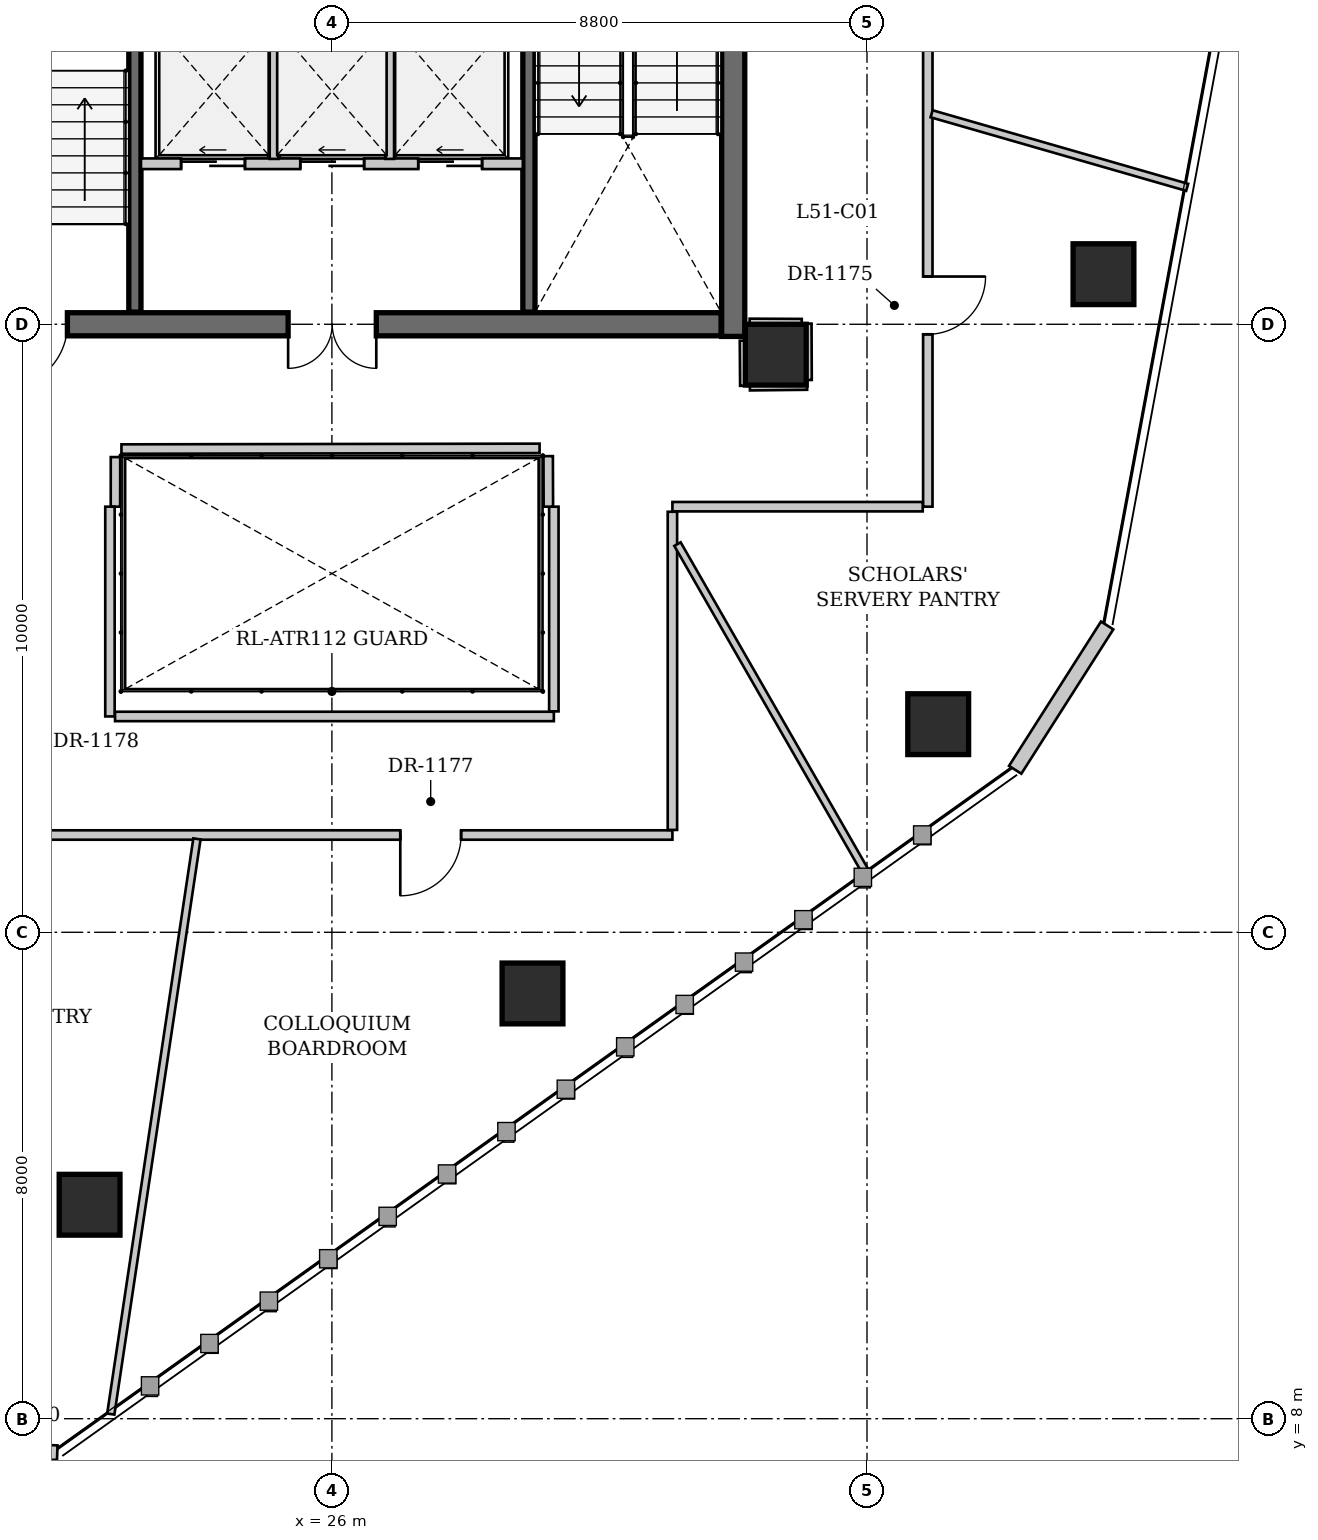
"""IFC4 building model, lengths in metres.
Left out: names, types, materials, properties, quantities, classifications, styles, units other than length and angle.
Written with IfcOpenShell. Run it as: python <this file> out.ifc"""

import sys

from ifc_helpers import new_model, si_unit, direction, frame, frame_2d, origin, origin_2d, place, context, subcontext, project, spatial, rectangle, extrude, source, transform, mapped, element, fill, save


model = new_model("IFC4")
c1 = context("Model", 3, precision=1e-05, world=origin(), true_north=direction((0.0, 1.0)))
c2 = subcontext(c1, "Body", "Model", "MODEL_VIEW")
j1 = project(units=[si_unit("LENGTHUNIT", "METRE"), si_unit("PLANEANGLEUNIT", "RADIAN")], contexts=[c1])
p1 = place(None, origin())
s1 = spatial("IfcSite", under=j1, at=p1, CompositionType="ELEMENT")
p2 = place(p1, origin())
s2 = spatial("IfcBuilding", under=s1, at=p2, CompositionType="ELEMENT")
p3 = place(p2, frame((0.0, 0.0, 195.0)))
s3 = spatial("IfcBuildingStorey", under=s2, at=p3, CompositionType="ELEMENT", Elevation=195.0)
for number, where, z_axis, x_axis in (
    (1, (38.689, 26.824, 0.0), (0.0, 0.0, 1.0), (1.0, 0.0, 0.0)),
    (2, (35.971, 19.423, 0.0), (0.0, 0.0, 1.0), (1.0, 0.0, 0.0)),
    (3, (29.299, 14.994, 0.0), (0.0, 0.0, 1.0), (1.0, 0.0, 0.0)),
    (4, (22.015, 11.519, 0.0), (0.0, 0.0, 1.0), (1.0, 0.0, 0.0)),
    (5, (33.3, 25.5, 0.0), (0.0, 0.0, 1.0), (1.0, 0.0, 0.0)),
):
    element("IfcColumn", number, at=place(p3, frame(where, z_axis=z_axis, x_axis=x_axis)), inside=s3, PredefinedType="COLUMN", context=c2, shape_type="SweptSolid", body=[
        extrude(rectangle(XDim=1.0, YDim=1.0, at=origin_2d()), origin(), (0.0, 0.0, 1.0), 3.23),
    ])
p4 = place(p3, frame((21.483, 7.441, 0.0), z_axis=(0.0, 0.0, 1.0), x_axis=(-0.999345597318, 0.036171495987, 0.0)))
e6 = element("IfcWall", 6, at=p4, inside=s3, PredefinedType="SOLIDWALL", context=c2, shape_type="SweptSolid", body=[
    extrude(rectangle(XDim=1.978, YDim=0.24, at=frame_2d((0.989, 0.0))), origin(), (0.0, 0.0, 1.0), 3.23),
])
p5 = place(p3, frame((38.75, 21.047, 0.0), z_axis=(0.0, 0.0, 1.0), x_axis=(-0.537329939946, -0.843372121687, 0.0)))
e7 = element("IfcWall", 7, at=p5, inside=s3, PredefinedType="SOLIDWALL", context=c2, shape_type="SweptSolid", body=[
    extrude(rectangle(XDim=2.815, YDim=0.24, at=frame_2d((1.408, 0.0))), origin(), (0.0, 0.0, 1.0), 3.23),
])
p6 = place(p3, frame((32.6, 36.6, 0.0), z_axis=(0.0, 0.0, 1.0), x_axis=(0.0, -1.0, 0.0)))
e8 = element("IfcWall", 8, at=p6, inside=s3, PredefinedType="SHEAR", context=c2, shape_type="SweptSolid", body=[
    extrude(rectangle(XDim=10.8, YDim=0.38, at=frame_2d((5.4, 0.0))), origin(), (0.0, 0.0, 1.0), 3.5),
])
p7 = place(p6, frame((3.7, 0.0, 0.0)))
e9 = element("IfcOpeningElement", 9, at=p7, cuts=e8, PredefinedType="OPENING", context=c2, shape_type="SweptSolid", body=[
    extrude(rectangle(XDim=1.05, YDim=2.15, at=frame_2d((0.525, 1.075))), frame((0.0, 0.2, 0.0), z_axis=(0.0, -1.0, 0.0), x_axis=(1.0, 0.0, 0.0)), (0.0, 0.0, 1.0), 0.4),
])
p8 = place(p6, frame((2.05, 0.0, 0.0)))
e10 = element("IfcOpeningElement", 10, at=p8, cuts=e8, PredefinedType="OPENING", context=c2, shape_type="SweptSolid", body=[
    extrude(rectangle(XDim=0.9, YDim=2.1, at=frame_2d((0.45, 1.05))), frame((0.0, 0.2, 0.0), z_axis=(0.0, -1.0, 0.0), x_axis=(1.0, 0.0, 0.0)), (0.0, 0.0, 1.0), 0.4),
])
p9 = place(p3, frame((32.4, 26.0, 0.0), z_axis=(0.0, 0.0, 1.0), x_axis=(-1.0, 0.0, 0.0)))
e11 = element("IfcWall", 11, at=p9, inside=s3, PredefinedType="SHEAR", context=c2, shape_type="SweptSolid", body=[
    extrude(rectangle(XDim=12.8, YDim=0.38, at=frame_2d((6.4, 0.0))), origin(), (0.0, 0.0, 1.0), 3.5),
])
p10 = place(p9, frame((10.75, 0.0, 0.0)))
e12 = element("IfcOpeningElement", 12, at=p10, cuts=e11, PredefinedType="OPENING", context=c2, shape_type="SweptSolid", body=[
    extrude(rectangle(XDim=1.05, YDim=2.15, at=frame_2d((0.525, 1.075))), frame((0.0, 0.2, 0.0), z_axis=(0.0, -1.0, 0.0), x_axis=(1.0, 0.0, 0.0)), (0.0, 0.0, 1.0), 0.4),
])
p11 = place(p9, frame((5.67, 0.0, 0.0)))
e13 = element("IfcOpeningElement", 13, at=p11, cuts=e11, PredefinedType="OPENING", context=c2, shape_type="SweptSolid", body=[
    extrude(rectangle(XDim=1.45, YDim=2.2, at=frame_2d((0.725, 1.1))), frame((0.0, 0.2, 0.0), z_axis=(0.0, -1.0, 0.0), x_axis=(1.0, 0.0, 0.0)), (0.0, 0.0, 1.0), 0.4),
])
p12 = place(p3, frame((22.76, 26.2, 0.0), z_axis=(0.0, 0.0, 1.0), x_axis=(0.0, 1.0, 0.0)))
e14 = element("IfcWall", 14, at=p12, inside=s3, PredefinedType="SHEAR", context=c2, shape_type="SweptSolid", body=[
    extrude(rectangle(XDim=10.0, YDim=0.2, at=frame_2d((5.0, 0.0))), origin(), (0.0, 0.0, 1.0), 3.5),
])
p13 = place(p3, frame((29.24, 26.2, 0.0), z_axis=(0.0, 0.0, 1.0), x_axis=(0.0, 1.0, 0.0)))
e15 = element("IfcWall", 15, at=p13, inside=s3, PredefinedType="SHEAR", context=c2, shape_type="SweptSolid", body=[
    extrude(rectangle(XDim=10.0, YDim=0.2, at=frame_2d((5.0, 0.0))), origin(), (0.0, 0.0, 1.0), 3.5),
])
p14 = place(p13, frame((5.65, 0.0, 0.0)))
e16 = element("IfcOpeningElement", 16, at=p14, cuts=e15, PredefinedType="OPENING", context=c2, shape_type="SweptSolid", body=[
    extrude(rectangle(XDim=1.05, YDim=2.15, at=frame_2d((0.525, 1.075))), frame((0.0, 0.11, 0.0), z_axis=(0.0, -1.0, 0.0), x_axis=(1.0, 0.0, 0.0)), (0.0, 0.0, 1.0), 0.22),
])
p15 = place(p3, frame((22.86, 28.64, 0.0), z_axis=(0.0, 0.0, 1.0), x_axis=(1.0, 0.0, 0.0)))
e17 = element("IfcWall", 17, at=p15, inside=s3, PredefinedType="SOLIDWALL", context=c2, shape_type="SweptSolid", body=[
    extrude(rectangle(XDim=6.28, YDim=0.175, at=frame_2d((3.14, 0.0))), origin(), (0.0, 0.0, 1.0), 3.23),
])
p16 = place(p15, frame((0.66, 0.0, 0.0)))
e18 = element("IfcOpeningElement", 18, at=p16, cuts=e17, PredefinedType="OPENING", context=c2, shape_type="SweptSolid", body=[
    extrude(rectangle(XDim=1.05, YDim=2.15, at=frame_2d((0.525, 1.075))), frame((0.0, 0.098, 0.0), z_axis=(0.0, -1.0, 0.0), x_axis=(1.0, 0.0, 0.0)), (0.0, 0.0, 1.0), 0.195),
])
p17 = place(p15, frame((2.62, 0.0, 0.0)))
e19 = element("IfcOpeningElement", 19, at=p17, cuts=e17, PredefinedType="OPENING", context=c2, shape_type="SweptSolid", body=[
    extrude(rectangle(XDim=1.05, YDim=2.15, at=frame_2d((0.525, 1.075))), frame((0.0, 0.098, 0.0), z_axis=(0.0, -1.0, 0.0), x_axis=(1.0, 0.0, 0.0)), (0.0, 0.0, 1.0), 0.195),
])
p18 = place(p15, frame((4.56, 0.0, 0.0)))
e20 = element("IfcOpeningElement", 20, at=p18, cuts=e17, PredefinedType="OPENING", context=c2, shape_type="SweptSolid", body=[
    extrude(rectangle(XDim=1.05, YDim=2.15, at=frame_2d((0.525, 1.075))), frame((0.0, 0.098, 0.0), z_axis=(0.0, -1.0, 0.0), x_axis=(1.0, 0.0, 0.0)), (0.0, 0.0, 1.0), 0.195),
])
for number, where, z_axis, x_axis in (
    (21, (25.05, 28.72, 0.0), (0.0, 0.0, 1.0), (0.0, 1.0, 0.0)),
    (22, (26.95, 28.72, 0.0), (0.0, 0.0, 1.0), (0.0, 1.0, 0.0)),
):
    element("IfcWall", number, at=place(p3, frame(where, z_axis=z_axis, x_axis=x_axis)), inside=s3, PredefinedType="SOLIDWALL", context=c2, shape_type="SweptSolid", body=[
        extrude(rectangle(XDim=2.207, YDim=0.145, at=frame_2d((1.103, 0.0))), origin(), (0.0, 0.0, 1.0), 3.23),
    ])
p19 = place(p3, frame((35.8, 36.6, 0.0), z_axis=(0.0, 0.0, 1.0), x_axis=(0.0, -1.0, 0.0)))
e23 = element("IfcWall", 23, at=p19, inside=s3, PredefinedType="PARTITIONING", context=c2, shape_type="SweptSolid", body=[
    extrude(rectangle(XDim=13.6, YDim=0.155, at=frame_2d((6.8, 0.0))), origin(), (0.0, 0.0, 1.0), 3.23),
])
p20 = place(p19, frame((9.815, 0.0, 0.0)))
e24 = element("IfcOpeningElement", 24, at=p20, cuts=e23, PredefinedType="OPENING", context=c2, shape_type="SweptSolid", body=[
    extrude(rectangle(XDim=0.95, YDim=2.15, at=frame_2d((0.475, 1.075))), frame((0.0, 0.087, 0.0), z_axis=(0.0, -1.0, 0.0), x_axis=(1.0, 0.0, 0.0)), (0.0, 0.0, 1.0), 0.175),
])
p21 = place(p19, frame((2.043, 0.0, 0.0)))
e25 = element("IfcOpeningElement", 25, at=p21, cuts=e23, PredefinedType="OPENING", context=c2, shape_type="SweptSolid", body=[
    extrude(rectangle(XDim=1.0, YDim=2.15, at=frame_2d((0.5, 1.075))), frame((0.0, 0.087, 0.0), z_axis=(0.0, -1.0, 0.0), x_axis=(1.0, 0.0, 0.0)), (0.0, 0.0, 1.0), 0.175),
])
p22 = place(p3, frame((31.6, 17.6, 0.0), z_axis=(0.0, 0.0, 1.0), x_axis=(-1.0, 0.0, 0.0)))
e26 = element("IfcWall", 26, at=p22, inside=s3, PredefinedType="PARTITIONING", context=c2, shape_type="SweptSolid", body=[
    extrude(rectangle(XDim=11.2, YDim=0.155, at=frame_2d((5.6, 0.0))), origin(), (0.0, 0.0, 1.0), 3.23),
])
p23 = place(p22, frame((3.475, 0.0, 0.0)))
e27 = element("IfcOpeningElement", 27, at=p23, cuts=e26, PredefinedType="OPENING", context=c2, shape_type="SweptSolid", body=[
    extrude(rectangle(XDim=1.0, YDim=2.15, at=frame_2d((0.5, 1.075))), frame((0.0, 0.087, 0.0), z_axis=(0.0, -1.0, 0.0), x_axis=(1.0, 0.0, 0.0)), (0.0, 0.0, 1.0), 0.175),
])
p24 = place(p3, frame((32.785, 25.73, 0.0), z_axis=(0.0, 0.0, 1.0), x_axis=(0.007570553288, -0.999971342951, 0.0)))
e28 = element("IfcWall", 28, at=p24, inside=s3, PredefinedType="PARTITIONING", context=c2, shape_type="SweptSolid", body=[
    extrude(rectangle(XDim=0.742, YDim=0.155, at=frame_2d((0.371, 0.0))), origin(), (0.0, 0.0, 1.0), 3.23),
])
p25 = place(p3, frame((32.874, 24.989, 0.0), z_axis=(0.0, 0.0, 1.0), x_axis=(0.999934835738, 0.01141596595, 0.0)))
e29 = element("IfcWall", 29, at=p25, inside=s3, PredefinedType="PARTITIONING", context=c2, shape_type="SweptSolid", body=[
    extrude(rectangle(XDim=0.941, YDim=0.155, at=frame_2d((0.47, 0.0))), origin(), (0.0, 0.0, 1.0), 3.23),
])
p26 = place(p3, frame((33.815, 25.083, 0.0), z_axis=(0.0, 0.0, 1.0), x_axis=(-0.004477173984, 0.999989977406, 0.0)))
e30 = element("IfcWall", 30, at=p26, inside=s3, PredefinedType="PARTITIONING", context=c2, shape_type="SweptSolid", body=[
    extrude(rectangle(XDim=0.927, YDim=0.155, at=frame_2d((0.463, 0.0))), origin(), (0.0, 0.0, 1.0), 3.23),
])
p27 = place(p3, frame((33.727, 26.011, 0.0), z_axis=(0.0, 0.0, 1.0), x_axis=(-0.999990868706, 0.004273465251, 0.0)))
e31 = element("IfcWall", 31, at=p27, inside=s3, PredefinedType="PARTITIONING", context=c2, shape_type="SweptSolid", body=[
    extrude(rectangle(XDim=0.857, YDim=0.155, at=frame_2d((0.428, 0.0))), origin(), (0.0, 0.0, 1.0), 3.23),
])
p28 = place(p3, frame((35.717, 23.0, 0.0), z_axis=(0.0, 0.0, 1.0), x_axis=(-1.0, 0.0, 0.0)))
e32 = element("IfcWall", 32, at=p28, inside=s3, PredefinedType="PARTITIONING", context=c2, shape_type="SweptSolid", body=[
    extrude(rectangle(XDim=4.116, YDim=0.155, at=frame_2d((2.058, 0.0))), origin(), (0.0, 0.0, 1.0), 3.23),
])
p29 = place(p3, frame((31.6, 22.917, 0.0), z_axis=(0.0, 0.0, 1.0), x_axis=(0.0, -1.0, 0.0)))
e33 = element("IfcWall", 33, at=p29, inside=s3, PredefinedType="PARTITIONING", context=c2, shape_type="SweptSolid", body=[
    extrude(rectangle(XDim=5.233, YDim=0.155, at=frame_2d((2.616, 0.0))), origin(), (0.0, 0.0, 1.0), 2.892),
])
p30 = place(p3, frame((29.416, 23.959, 0.0), z_axis=(0.0, 0.0, 1.0), x_axis=(-0.999998607957, -0.001668557745, 0.0)))
e34 = element("IfcWall", 34, at=p30, inside=s3, PredefinedType="PARTITIONING", context=c2, shape_type="SweptSolid", body=[
    extrude(rectangle(XDim=6.877, YDim=0.155, at=frame_2d((3.438, 0.0))), origin(), (0.0, 0.0, 1.0), 3.23),
])
p31 = place(p3, frame((22.441, 23.816, 0.0), z_axis=(0.0, 0.0, 1.0), x_axis=(-0.001197245475, -0.999999283301, 0.0)))
e35 = element("IfcWall", 35, at=p31, inside=s3, PredefinedType="PARTITIONING", context=c2, shape_type="SweptSolid", body=[
    extrude(rectangle(XDim=0.816, YDim=0.155, at=frame_2d((0.408, 0.0))), origin(), (0.0, 0.0, 1.0), 3.23),
])
p32 = place(p3, frame((22.35, 23.0, 0.0), z_axis=(0.0, 0.0, 1.0), x_axis=(0.0, -1.0, 0.0)))
e36 = element("IfcWall", 36, at=p32, inside=s3, PredefinedType="PARTITIONING", context=c2, shape_type="SweptSolid", body=[
    extrude(rectangle(XDim=3.45, YDim=0.155, at=frame_2d((1.725, 0.0))), origin(), (0.0, 0.0, 1.0), 3.23),
])
p33 = place(p3, frame((22.434, 19.55, 0.0), z_axis=(0.0, 0.0, 1.0), x_axis=(1.0, 0.0, 0.0)))
e37 = element("IfcWall", 37, at=p33, inside=s3, PredefinedType="PARTITIONING", context=c2, shape_type="SweptSolid", body=[
    extrude(rectangle(XDim=7.216, YDim=0.155, at=frame_2d((3.608, 0.0))), origin(), (0.0, 0.0, 1.0), 3.23),
])
p34 = place(p3, frame((29.65, 19.634, 0.0), z_axis=(0.0, 0.0, 1.0), x_axis=(0.0, 1.0, 0.0)))
e38 = element("IfcWall", 38, at=p34, inside=s3, PredefinedType="PARTITIONING", context=c2, shape_type="SweptSolid", body=[
    extrude(rectangle(XDim=3.366, YDim=0.155, at=frame_2d((1.683, 0.0))), origin(), (0.0, 0.0, 1.0), 3.23),
])
p35 = place(p3, frame((29.56, 23.0, 0.0), z_axis=(0.0, 0.0, 1.0), x_axis=(-0.003817887006, 0.999992711843, 0.0)))
e39 = element("IfcWall", 39, at=p35, inside=s3, PredefinedType="PARTITIONING", context=c2, shape_type="SweptSolid", body=[
    extrude(rectangle(XDim=0.831, YDim=0.155, at=frame_2d((0.416, 0.0))), origin(), (0.0, 0.0, 1.0), 3.23),
])
p36 = place(p3, frame((23.781, 17.536, 0.0), z_axis=(0.0, 0.0, 1.0), x_axis=(-0.148146984472, -0.988965353787, 0.0)))
e40 = element("IfcWall", 40, at=p36, inside=s3, PredefinedType="PARTITIONING", context=c2, shape_type="SweptSolid", body=[
    extrude(rectangle(XDim=9.565, YDim=0.12, at=frame_2d((4.782, 0.0))), origin(), (0.0, 0.0, 1.0), 3.23),
])
p37 = place(p3, frame((31.684, 22.385, 0.0), z_axis=(0.0, 0.0, 1.0), x_axis=(0.497684374139, -0.867358209587, 0.0)))
e41 = element("IfcWall", 41, at=p37, inside=s3, PredefinedType="PARTITIONING", context=c2, shape_type="SweptSolid", body=[
    extrude(rectangle(XDim=6.258, YDim=0.12, at=frame_2d((3.129, 0.0))), origin(), (0.0, 0.0, 1.0), 3.23),
])
p38 = place(p3, frame((35.863, 29.462, 0.0), z_axis=(0.0, 0.0, 1.0), x_axis=(0.960999786339, -0.276549110748, 0.0)))
e42 = element("IfcWall", 42, at=p38, inside=s3, PredefinedType="PARTITIONING", context=c2, shape_type="SweptSolid", body=[
    extrude(rectangle(XDim=4.374, YDim=0.12, at=frame_2d((2.187, 0.0))), origin(), (0.0, 0.0, 1.0), 3.23),
])
m1 = source(origin(), c2, "Body", "SweptSolid", [
    extrude(rectangle(XDim=1.05, YDim=2.15, at=frame_2d((0.525, 1.075))), frame((0.0, 0.025, 0.0), z_axis=(0.0, -1.0, 0.0), x_axis=(1.0, 0.0, 0.0)), (0.0, 0.0, 1.0), 0.05),
])
p39 = place(p10, origin())
e43 = element("IfcDoor", 43, at=p39, inside=s3, OperationType="SINGLE_SWING_RIGHT", PredefinedType="DOOR", context=c2, shape_type="MappedRepresentation", body=[
    mapped(m1, transform((0.0, 0.0, 0.0), x_axis=(1.0, 0.0, 0.0), y_axis=(0.0, 1.0, 0.0), z_axis=(0.0, 0.0, 1.0), scale=1.0)),
])
fill(e12, e43)
m2 = source(origin(), c2, "Body", "SweptSolid", [
    extrude(rectangle(XDim=1.45, YDim=2.2, at=frame_2d((0.725, 1.1))), frame((0.0, 0.025, 0.0), z_axis=(0.0, -1.0, 0.0), x_axis=(1.0, 0.0, 0.0)), (0.0, 0.0, 1.0), 0.05),
])
p40 = place(p11, origin())
e44 = element("IfcDoor", 44, at=p40, inside=s3, OperationType="DOUBLE_DOOR_SINGLE_SWING", PredefinedType="DOOR", context=c2, shape_type="MappedRepresentation", body=[
    mapped(m2, transform((0.0, 0.0, 0.0), x_axis=(1.0, 0.0, 0.0), y_axis=(0.0, 1.0, 0.0), z_axis=(0.0, 0.0, 1.0), scale=1.0)),
])
fill(e13, e44)
m3 = source(origin(), c2, "Body", "SweptSolid", [
    extrude(rectangle(XDim=1.05, YDim=2.15, at=frame_2d((0.525, 1.075))), frame((0.0, 0.025, 0.0), z_axis=(0.0, -1.0, 0.0), x_axis=(1.0, 0.0, 0.0)), (0.0, 0.0, 1.0), 0.05),
])
p41 = place(p16, origin())
e45 = element("IfcDoor", 45, at=p41, inside=s3, OperationType="SLIDING_TO_LEFT", PredefinedType="DOOR", context=c2, shape_type="MappedRepresentation", body=[
    mapped(m3, transform((0.0, 0.0, 0.0), x_axis=(1.0, 0.0, 0.0), y_axis=(0.0, 1.0, 0.0), z_axis=(0.0, 0.0, 1.0), scale=1.0)),
])
fill(e18, e45)
p42 = place(p17, origin())
e46 = element("IfcDoor", 46, at=p42, inside=s3, OperationType="SLIDING_TO_LEFT", PredefinedType="DOOR", context=c2, shape_type="MappedRepresentation", body=[
    mapped(m3, transform((0.0, 0.0, 0.0), x_axis=(1.0, 0.0, 0.0), y_axis=(0.0, 1.0, 0.0), z_axis=(0.0, 0.0, 1.0), scale=1.0)),
])
fill(e19, e46)
p43 = place(p18, origin())
e47 = element("IfcDoor", 47, at=p43, inside=s3, OperationType="SLIDING_TO_LEFT", PredefinedType="DOOR", context=c2, shape_type="MappedRepresentation", body=[
    mapped(m3, transform((0.0, 0.0, 0.0), x_axis=(1.0, 0.0, 0.0), y_axis=(0.0, 1.0, 0.0), z_axis=(0.0, 0.0, 1.0), scale=1.0)),
])
fill(e20, e47)
m4 = source(origin(), c2, "Body", "SweptSolid", [
    extrude(rectangle(XDim=0.95, YDim=2.15, at=frame_2d((0.475, 1.075))), frame((0.0, 0.025, 0.0), z_axis=(0.0, -1.0, 0.0), x_axis=(1.0, 0.0, 0.0)), (0.0, 0.0, 1.0), 0.05),
])
p44 = place(p20, origin())
e48 = element("IfcDoor", 48, at=p44, inside=s3, OperationType="SINGLE_SWING_LEFT", PredefinedType="DOOR", context=c2, shape_type="MappedRepresentation", body=[
    mapped(m4, transform((0.0, 0.0, 0.0), x_axis=(1.0, 0.0, 0.0), y_axis=(0.0, 1.0, 0.0), z_axis=(0.0, 0.0, 1.0), scale=1.0)),
])
fill(e24, e48)
m5 = source(origin(), c2, "Body", "SweptSolid", [
    extrude(rectangle(XDim=1.0, YDim=2.15, at=frame_2d((0.5, 1.075))), frame((0.0, 0.025, 0.0), z_axis=(0.0, -1.0, 0.0), x_axis=(1.0, 0.0, 0.0)), (0.0, 0.0, 1.0), 0.05),
])
p45 = place(p23, origin())
e49 = element("IfcDoor", 49, at=p45, inside=s3, OperationType="SINGLE_SWING_RIGHT", PredefinedType="DOOR", context=c2, shape_type="MappedRepresentation", body=[
    mapped(m5, transform((0.0, 0.0, 0.0), x_axis=(1.0, 0.0, 0.0), y_axis=(0.0, 1.0, 0.0), z_axis=(0.0, 0.0, 1.0), scale=1.0)),
])
fill(e27, e49)
save(model, sys.argv[1])
